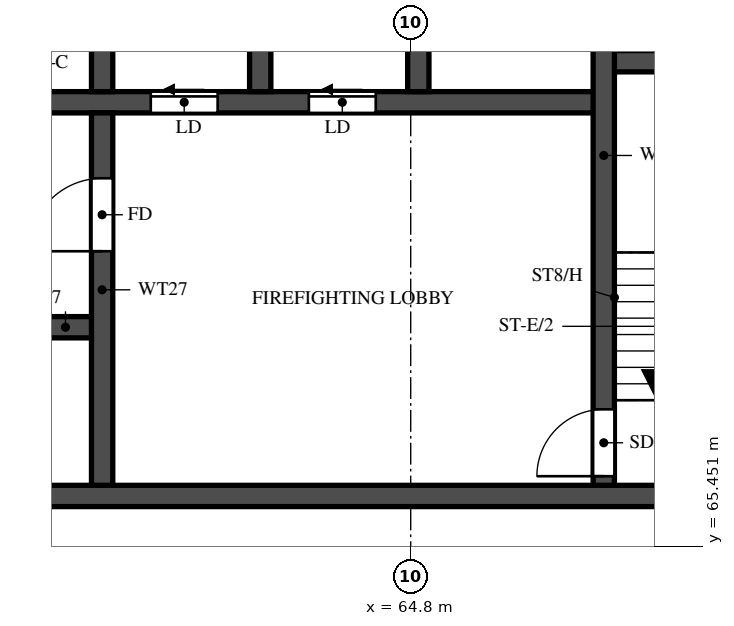
"""IFC4 building model, lengths in metres.
Left out: names, types, materials, properties, quantities, classifications, styles, units other than length and angle.
Written with IfcOpenShell. Run it as: python <this file> out.ifc"""

import sys

from ifc_helpers import new_model, si_unit, direction, frame, frame_2d, origin, place, context, subcontext, project, spatial, rectangle, extrude, element, fill, save


model = new_model("IFC4")
c1 = context("Model", 3, precision=1e-05, world=origin(), true_north=direction((0.0, 1.0)))
c2 = subcontext(c1, "Body", "Model", "MODEL_VIEW")
j1 = project(units=[si_unit("LENGTHUNIT", "METRE"), si_unit("PLANEANGLEUNIT", "RADIAN")], contexts=[c1])
p1 = place(None, origin())
s1 = spatial("IfcSite", under=j1, at=p1, CompositionType="ELEMENT")
p2 = place(p1, origin())
s2 = spatial("IfcBuilding", under=s1, at=p2, CompositionType="ELEMENT")
p3 = place(p2, frame((0.0, 0.0, 164.0)))
s3 = spatial("IfcBuildingStorey", under=s2, at=p3, CompositionType="ELEMENT", Elevation=164.0)
p4 = place(p3, frame((29.7, 66.275, 0.0), z_axis=(0.0, 0.0, 1.0), x_axis=(1.0, 0.0, 0.0)))
e1 = element("IfcWall", 1, at=p4, inside=s3, PredefinedType="SHEAR", context=c2, shape_type="SweptSolid", body=[
    extrude(rectangle(XDim=41.4, YDim=0.35, at=frame_2d((20.7, 0.0))), origin(), (0.0, 0.0, 1.0), 3.2),
])
p5 = place(p4, frame((0.925, 0.0, 0.0)))
e2 = element("IfcOpeningElement", 2, at=p5, cuts=e1, PredefinedType="OPENING", context=c2, shape_type="SweptSolid", body=[
    extrude(rectangle(XDim=1.1, YDim=2.1, at=frame_2d((0.55, 1.05))), frame((0.0, 0.185, 0.0), z_axis=(0.0, -1.0, 0.0), x_axis=(1.0, 0.0, 0.0)), (0.0, 0.0, 1.0), 0.37),
])
p6 = place(p4, frame((3.712, 0.0, 0.0)))
e3 = element("IfcOpeningElement", 3, at=p6, cuts=e1, PredefinedType="OPENING", context=c2, shape_type="SweptSolid", body=[
    extrude(rectangle(XDim=1.8, YDim=2.1, at=frame_2d((0.9, 1.05))), frame((0.0, 0.185, 0.0), z_axis=(0.0, -1.0, 0.0), x_axis=(1.0, 0.0, 0.0)), (0.0, 0.0, 1.0), 0.37),
])
p7 = place(p3, frame((35.625, 69.05, 0.0), z_axis=(0.0, 0.0, 1.0), x_axis=(1.0, 0.0, 0.0)))
e4 = element("IfcWall", 4, at=p7, inside=s3, PredefinedType="SHEAR", context=c2, shape_type="SweptSolid", body=[
    extrude(rectangle(XDim=24.1, YDim=0.35, at=frame_2d((12.05, 0.0))), origin(), (0.0, 0.0, 1.0), 3.2),
])
p8 = place(p7, frame((1.0, 0.0, 0.0)))
e5 = element("IfcOpeningElement", 5, at=p8, cuts=e4, PredefinedType="OPENING", context=c2, shape_type="SweptSolid", body=[
    extrude(rectangle(XDim=1.1, YDim=2.1, at=frame_2d((0.55, 1.05))), frame((0.0, 0.185, 0.0), z_axis=(0.0, -1.0, 0.0), x_axis=(1.0, 0.0, 0.0)), (0.0, 0.0, 1.0), 0.37),
])
p9 = place(p7, frame((3.75, 0.0, 0.0)))
e6 = element("IfcOpeningElement", 6, at=p9, cuts=e4, PredefinedType="OPENING", context=c2, shape_type="SweptSolid", body=[
    extrude(rectangle(XDim=1.1, YDim=2.1, at=frame_2d((0.55, 1.05))), frame((0.0, 0.185, 0.0), z_axis=(0.0, -1.0, 0.0), x_axis=(1.0, 0.0, 0.0)), (0.0, 0.0, 1.0), 0.37),
])
p10 = place(p7, frame((6.5, 0.0, 0.0)))
e7 = element("IfcOpeningElement", 7, at=p10, cuts=e4, PredefinedType="OPENING", context=c2, shape_type="SweptSolid", body=[
    extrude(rectangle(XDim=1.1, YDim=2.1, at=frame_2d((0.55, 1.05))), frame((0.0, 0.185, 0.0), z_axis=(0.0, -1.0, 0.0), x_axis=(1.0, 0.0, 0.0)), (0.0, 0.0, 1.0), 0.37),
])
p11 = place(p7, frame((9.25, 0.0, 0.0)))
e8 = element("IfcOpeningElement", 8, at=p11, cuts=e4, PredefinedType="OPENING", context=c2, shape_type="SweptSolid", body=[
    extrude(rectangle(XDim=1.1, YDim=2.1, at=frame_2d((0.55, 1.05))), frame((0.0, 0.185, 0.0), z_axis=(0.0, -1.0, 0.0), x_axis=(1.0, 0.0, 0.0)), (0.0, 0.0, 1.0), 0.37),
])
p12 = place(p7, frame((12.0, 0.0, 0.0)))
e9 = element("IfcOpeningElement", 9, at=p12, cuts=e4, PredefinedType="OPENING", context=c2, shape_type="SweptSolid", body=[
    extrude(rectangle(XDim=1.1, YDim=2.1, at=frame_2d((0.55, 1.05))), frame((0.0, 0.185, 0.0), z_axis=(0.0, -1.0, 0.0), x_axis=(1.0, 0.0, 0.0)), (0.0, 0.0, 1.0), 0.37),
])
p13 = place(p7, frame((14.75, 0.0, 0.0)))
e10 = element("IfcOpeningElement", 10, at=p13, cuts=e4, PredefinedType="OPENING", context=c2, shape_type="SweptSolid", body=[
    extrude(rectangle(XDim=1.1, YDim=2.1, at=frame_2d((0.55, 1.05))), frame((0.0, 0.185, 0.0), z_axis=(0.0, -1.0, 0.0), x_axis=(1.0, 0.0, 0.0)), (0.0, 0.0, 1.0), 0.37),
])
p14 = place(p7, frame((17.625, 0.0, 0.0)))
e11 = element("IfcOpeningElement", 11, at=p14, cuts=e4, PredefinedType="OPENING", context=c2, shape_type="SweptSolid", body=[
    extrude(rectangle(XDim=1.1, YDim=2.1, at=frame_2d((0.55, 1.05))), frame((0.0, 0.185, 0.0), z_axis=(0.0, -1.0, 0.0), x_axis=(1.0, 0.0, 0.0)), (0.0, 0.0, 1.0), 0.37),
])
p15 = place(p7, frame((20.625, 0.0, 0.0)))
e12 = element("IfcOpeningElement", 12, at=p15, cuts=e4, PredefinedType="OPENING", context=c2, shape_type="SweptSolid", body=[
    extrude(rectangle(XDim=1.1, YDim=2.1, at=frame_2d((0.55, 1.05))), frame((0.0, 0.185, 0.0), z_axis=(0.0, -1.0, 0.0), x_axis=(1.0, 0.0, 0.0)), (0.0, 0.0, 1.0), 0.37),
])
p16 = place(p3, frame((32.825, 72.75, 0.0), z_axis=(0.0, 0.0, 1.0), x_axis=(1.0, 0.0, 0.0)))
e13 = element("IfcWall", 13, at=p16, inside=s3, PredefinedType="SHEAR", context=c2, shape_type="SweptSolid", body=[
    extrude(rectangle(XDim=35.15, YDim=0.35, at=frame_2d((17.575, 0.0))), origin(), (0.0, 0.0, 1.0), 3.2),
])
p17 = place(p16, frame((19.8, 0.0, 0.0)))
e14 = element("IfcOpeningElement", 14, at=p17, cuts=e13, PredefinedType="OPENING", context=c2, shape_type="SweptSolid", body=[
    extrude(rectangle(XDim=1.1, YDim=2.1, at=frame_2d((0.55, 1.05))), frame((0.0, 0.185, 0.0), z_axis=(0.0, -1.0, 0.0), x_axis=(1.0, 0.0, 0.0)), (0.0, 0.0, 1.0), 0.37),
])
p18 = place(p16, frame((27.7, 0.0, 0.0)))
e15 = element("IfcOpeningElement", 15, at=p18, cuts=e13, PredefinedType="OPENING", context=c2, shape_type="SweptSolid", body=[
    extrude(rectangle(XDim=1.1, YDim=2.1, at=frame_2d((0.55, 1.05))), frame((0.0, 0.185, 0.0), z_axis=(0.0, -1.0, 0.0), x_axis=(1.0, 0.0, 0.0)), (0.0, 0.0, 1.0), 0.37),
])
p19 = place(p16, frame((30.3, 0.0, 0.0)))
e16 = element("IfcOpeningElement", 16, at=p19, cuts=e13, PredefinedType="OPENING", context=c2, shape_type="SweptSolid", body=[
    extrude(rectangle(XDim=1.1, YDim=2.1, at=frame_2d((0.55, 1.05))), frame((0.0, 0.185, 0.0), z_axis=(0.0, -1.0, 0.0), x_axis=(1.0, 0.0, 0.0)), (0.0, 0.0, 1.0), 0.37),
])
p20 = place(p16, frame((3.8, 0.0, 0.0)))
e17 = element("IfcOpeningElement", 17, at=p20, cuts=e13, PredefinedType="OPENING", context=c2, shape_type="SweptSolid", body=[
    extrude(rectangle(XDim=1.1, YDim=2.1, at=frame_2d((0.55, 1.05))), frame((0.0, 0.185, 0.0), z_axis=(0.0, -1.0, 0.0), x_axis=(1.0, 0.0, 0.0)), (0.0, 0.0, 1.0), 0.37),
])
p21 = place(p16, frame((6.55, 0.0, 0.0)))
e18 = element("IfcOpeningElement", 18, at=p21, cuts=e13, PredefinedType="OPENING", context=c2, shape_type="SweptSolid", body=[
    extrude(rectangle(XDim=1.1, YDim=2.1, at=frame_2d((0.55, 1.05))), frame((0.0, 0.185, 0.0), z_axis=(0.0, -1.0, 0.0), x_axis=(1.0, 0.0, 0.0)), (0.0, 0.0, 1.0), 0.37),
])
p22 = place(p16, frame((9.3, 0.0, 0.0)))
e19 = element("IfcOpeningElement", 19, at=p22, cuts=e13, PredefinedType="OPENING", context=c2, shape_type="SweptSolid", body=[
    extrude(rectangle(XDim=1.1, YDim=2.1, at=frame_2d((0.55, 1.05))), frame((0.0, 0.185, 0.0), z_axis=(0.0, -1.0, 0.0), x_axis=(1.0, 0.0, 0.0)), (0.0, 0.0, 1.0), 0.37),
])
p23 = place(p16, frame((12.05, 0.0, 0.0)))
e20 = element("IfcOpeningElement", 20, at=p23, cuts=e13, PredefinedType="OPENING", context=c2, shape_type="SweptSolid", body=[
    extrude(rectangle(XDim=1.1, YDim=2.1, at=frame_2d((0.55, 1.05))), frame((0.0, 0.185, 0.0), z_axis=(0.0, -1.0, 0.0), x_axis=(1.0, 0.0, 0.0)), (0.0, 0.0, 1.0), 0.37),
])
p24 = place(p16, frame((14.8, 0.0, 0.0)))
e21 = element("IfcOpeningElement", 21, at=p24, cuts=e13, PredefinedType="OPENING", context=c2, shape_type="SweptSolid", body=[
    extrude(rectangle(XDim=1.1, YDim=2.1, at=frame_2d((0.55, 1.05))), frame((0.0, 0.185, 0.0), z_axis=(0.0, -1.0, 0.0), x_axis=(1.0, 0.0, 0.0)), (0.0, 0.0, 1.0), 0.37),
])
p25 = place(p16, frame((17.55, 0.0, 0.0)))
e22 = element("IfcOpeningElement", 22, at=p25, cuts=e13, PredefinedType="OPENING", context=c2, shape_type="SweptSolid", body=[
    extrude(rectangle(XDim=1.1, YDim=2.1, at=frame_2d((0.55, 1.05))), frame((0.0, 0.185, 0.0), z_axis=(0.0, -1.0, 0.0), x_axis=(1.0, 0.0, 0.0)), (0.0, 0.0, 1.0), 0.37),
])
p26 = place(p16, frame((0.938, 0.0, 0.0)))
e23 = element("IfcOpeningElement", 23, at=p26, cuts=e13, PredefinedType="OPENING", context=c2, shape_type="SweptSolid", body=[
    extrude(rectangle(XDim=1.1, YDim=2.1, at=frame_2d((0.55, 1.05))), frame((0.0, 0.185, 0.0), z_axis=(0.0, -1.0, 0.0), x_axis=(1.0, 0.0, 0.0)), (0.0, 0.0, 1.0), 0.37),
])
p27 = place(p3, frame((67.975, 73.425, 0.0), z_axis=(0.0, 0.0, 1.0), x_axis=(1.0, 0.0, 0.0)))
e24 = element("IfcWall", 24, at=p27, inside=s3, PredefinedType="SHEAR", context=c2, shape_type="SweptSolid", body=[
    extrude(rectangle(XDim=3.125, YDim=0.35, at=frame_2d((1.562, 0.0))), origin(), (0.0, 0.0, 1.0), 3.2),
])
p28 = place(p3, frame((67.975, 66.45, 0.0), z_axis=(0.0, 0.0, 1.0), x_axis=(0.0, 1.0, 0.0)))
e25 = element("IfcWall", 25, at=p28, inside=s3, PredefinedType="SHEAR", context=c2, shape_type="SweptSolid", body=[
    extrude(rectangle(XDim=10.85, YDim=0.35, at=frame_2d((5.425, 0.0))), origin(), (0.0, 0.0, 1.0), 3.2),
])
p29 = place(p28, frame((0.15, 0.0, 0.0)))
e26 = element("IfcOpeningElement", 26, at=p29, cuts=e25, PredefinedType="OPENING", context=c2, shape_type="SweptSolid", body=[
    extrude(rectangle(XDim=1.1, YDim=2.1, at=frame_2d((0.55, 1.05))), frame((0.0, 0.185, 0.0), z_axis=(0.0, -1.0, 0.0), x_axis=(1.0, 0.0, 0.0)), (0.0, 0.0, 1.0), 0.37),
])
p30 = place(p3, frame((59.725, 66.45, 0.0), z_axis=(0.0, 0.0, 1.0), x_axis=(0.0, 1.0, 0.0)))
e27 = element("IfcWall", 27, at=p30, inside=s3, PredefinedType="SHEAR", context=c2, shape_type="SweptSolid", body=[
    extrude(rectangle(XDim=6.125, YDim=0.35, at=frame_2d((3.062, 0.0))), origin(), (0.0, 0.0, 1.0), 3.2),
])
p31 = place(p30, frame((3.85, 0.0, 0.0)))
e28 = element("IfcOpeningElement", 28, at=p31, cuts=e27, PredefinedType="OPENING", context=c2, shape_type="SweptSolid", body=[
    extrude(rectangle(XDim=1.2, YDim=2.1, at=frame_2d((0.6, 1.05))), frame((0.0, 0.185, 0.0), z_axis=(0.0, -1.0, 0.0), x_axis=(1.0, 0.0, 0.0)), (0.0, 0.0, 1.0), 0.37),
])
for number, where, z_axis, x_axis in (
    (29, (59.725, 72.925, 0.0), (0.0, 0.0, 1.0), (0.0, 1.0, 0.0)),
    (30, (62.325, 72.925, 0.0), (0.0, 0.0, 1.0), (0.0, 1.0, 0.0)),
    (31, (64.925, 72.925, 0.0), (0.0, 0.0, 1.0), (0.0, 1.0, 0.0)),
):
    element("IfcWall", number, at=place(p3, frame(where, z_axis=z_axis, x_axis=x_axis)), inside=s3, PredefinedType="SHEAR", context=c2, shape_type="SweptSolid", body=[
        extrude(rectangle(XDim=2.95, YDim=0.35, at=frame_2d((1.475, 0.0))), origin(), (0.0, 0.0, 1.0), 3.2),
    ])
p32 = place(p29, origin())
e32 = element("IfcDoor", 32, at=p32, inside=s3, OperationType="SINGLE_SWING_LEFT", PredefinedType="DOOR", context=c2, shape_type="SweptSolid", body=[
    extrude(rectangle(XDim=1.1, YDim=2.1, at=frame_2d((0.55, 1.05))), frame((0.0, 0.025, 0.0), z_axis=(0.0, -1.0, 0.0), x_axis=(1.0, 0.0, 0.0)), (0.0, 0.0, 1.0), 0.05),
])
fill(e26, e32)
p33 = place(p31, origin())
e33 = element("IfcDoor", 33, at=p33, inside=s3, OperationType="SINGLE_SWING_LEFT", PredefinedType="DOOR", context=c2, shape_type="SweptSolid", body=[
    extrude(rectangle(XDim=1.2, YDim=2.1, at=frame_2d((0.6, 1.05))), frame((0.0, 0.025, 0.0), z_axis=(0.0, -1.0, 0.0), x_axis=(1.0, 0.0, 0.0)), (0.0, 0.0, 1.0), 0.05),
])
fill(e28, e33)
p34 = place(p18, origin())
e34 = element("IfcDoor", 34, at=p34, inside=s3, OperationType="SLIDING_TO_LEFT", PredefinedType="DOOR", context=c2, shape_type="SweptSolid", body=[
    extrude(rectangle(XDim=1.1, YDim=2.1, at=frame_2d((0.55, 1.05))), frame((0.0, 0.025, 0.0), z_axis=(0.0, -1.0, 0.0), x_axis=(1.0, 0.0, 0.0)), (0.0, 0.0, 1.0), 0.05),
])
fill(e15, e34)
p35 = place(p19, origin())
e35 = element("IfcDoor", 35, at=p35, inside=s3, OperationType="SLIDING_TO_LEFT", PredefinedType="DOOR", context=c2, shape_type="SweptSolid", body=[
    extrude(rectangle(XDim=1.1, YDim=2.1, at=frame_2d((0.55, 1.05))), frame((0.0, 0.025, 0.0), z_axis=(0.0, -1.0, 0.0), x_axis=(1.0, 0.0, 0.0)), (0.0, 0.0, 1.0), 0.05),
])
fill(e16, e35)
save(model, sys.argv[1])
